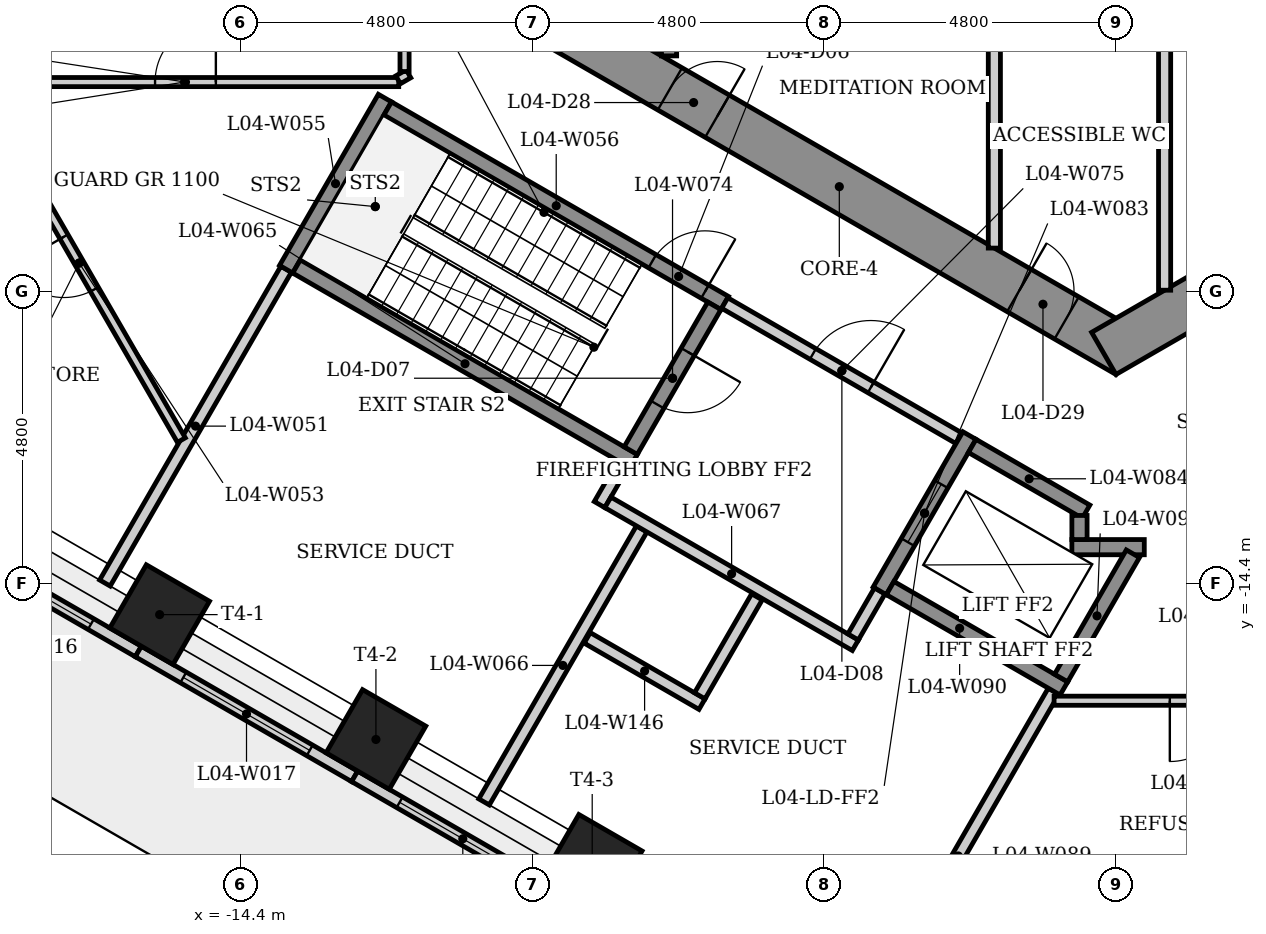
"""IFC4 building model, lengths in metres.
Left out: names, types, materials, properties, quantities, classifications, styles, units other than length and angle.
Written with IfcOpenShell. Run it as: python <this file> out.ifc"""

import sys

from ifc_helpers import new_model, si_unit, direction, frame, frame_2d, origin, origin_2d, place, context, subcontext, project, spatial, rectangle, extrude, element, fill, save


model = new_model("IFC4")
c1 = context("Model", 3, precision=1e-05, world=origin(), true_north=direction((0.0, 1.0)))
c2 = subcontext(c1, "Body", "Model", "MODEL_VIEW")
j1 = project(units=[si_unit("LENGTHUNIT", "METRE"), si_unit("PLANEANGLEUNIT", "RADIAN")], contexts=[c1])
p1 = place(None, origin())
s1 = spatial("IfcSite", under=j1, at=p1, CompositionType="ELEMENT")
p2 = place(p1, origin())
s2 = spatial("IfcBuilding", under=s1, at=p2, CompositionType="ELEMENT")
p3 = place(p2, frame((0.0, 0.0, 20.5)))
s3 = spatial("IfcBuildingStorey", under=s2, at=p3, CompositionType="ELEMENT", Elevation=20.5)
p4 = place(p3, frame((-9.3, -5.138, 0.0), z_axis=(0.0, 0.0, 1.0), x_axis=(0.866023993627, -0.500002442456, 0.0)))
e1 = element("IfcWall", 1, at=p4, inside=s3, PredefinedType="SHEAR", context=c2, shape_type="SweptSolid", body=[
    extrude(rectangle(XDim=10.97, YDim=0.8, at=frame_2d((5.485, 0.0))), origin(), (0.0, 0.0, 1.0), 5.0),
])
p5 = place(p4, frame((2.268, 0.0, 0.0)))
e2 = element("IfcOpeningElement", 2, at=p5, cuts=e1, PredefinedType="OPENING", context=c2, shape_type="SweptSolid", body=[
    extrude(rectangle(XDim=0.9, YDim=2.1, at=frame_2d((0.45, 1.05))), frame((0.0, 0.41, 0.0), z_axis=(0.0, -1.0, 0.0), x_axis=(1.0, 0.0, 0.0)), (0.0, 0.0, 1.0), 0.82),
])
p6 = place(p4, frame((8.903, 0.0, 0.0)))
e3 = element("IfcOpeningElement", 3, at=p6, cuts=e1, PredefinedType="OPENING", context=c2, shape_type="SweptSolid", body=[
    extrude(rectangle(XDim=0.9, YDim=2.1, at=frame_2d((0.45, 1.05))), frame((0.0, 0.41, 0.0), z_axis=(0.0, -1.0, 0.0), x_axis=(1.0, 0.0, 0.0)), (0.0, 0.0, 1.0), 0.82),
])
p7 = place(p3, frame((-0.2, -10.623, 0.0), z_axis=(0.0, 0.0, 1.0), x_axis=(0.866023993627, 0.500002442456, 0.0)))
e4 = element("IfcWall", 4, at=p7, inside=s3, PredefinedType="SHEAR", context=c2, shape_type="SweptSolid", body=[
    extrude(rectangle(XDim=10.97, YDim=0.8, at=frame_2d((5.485, 0.0))), origin(), (0.0, 0.0, 1.0), 5.0),
])
p8 = place(p7, frame((7.108, 0.0, 0.0)))
e5 = element("IfcOpeningElement", 5, at=p8, cuts=e4, PredefinedType="OPENING", context=c2, shape_type="SweptSolid", body=[
    extrude(rectangle(XDim=0.9, YDim=2.1, at=frame_2d((0.45, 1.05))), frame((0.0, 0.41, 0.0), z_axis=(0.0, -1.0, 0.0), x_axis=(1.0, 0.0, 0.0)), (0.0, 0.0, 1.0), 0.82),
])
for number, where, z_axis, x_axis in (
    (6, (-15.728, -14.92, 0.0), (0.0, 0.0, 1.0), (-0.5, -0.866, 0.0)),
    (7, (-12.171, -16.973, 0.0), (0.0, 0.0, 1.0), (-0.5, -0.866, 0.0)),
    (8, (-8.614, -19.027, 0.0), (0.0, 0.0, 1.0), (-0.5, -0.866, 0.0)),
):
    element("IfcColumn", number, at=place(p3, frame(where, z_axis=z_axis, x_axis=x_axis)), inside=s3, PredefinedType="COLUMN", context=c2, shape_type="SweptSolid", body=[
        extrude(rectangle(XDim=1.2, YDim=1.2, at=origin_2d()), origin(), (0.0, 0.0, 1.0), 5.0),
    ])
p9 = place(p3, frame((-19.714, -13.426, 0.0), z_axis=(0.0, 0.0, 1.0), x_axis=(0.866041321553, -0.499972428603, 0.0)))
e9 = element("IfcWall", 9, at=p9, inside=s3, PredefinedType="SOLIDWALL", context=c2, shape_type="SweptSolid", body=[
    extrude(rectangle(XDim=4.199, YDim=0.2, at=frame_2d((2.1, 0.0))), origin(), (0.0, 0.0, 1.0), 4.88),
])
p10 = place(p9, frame((0.899, 0.0, 0.8)))
e10 = element("IfcOpeningElement", 10, at=p10, cuts=e9, PredefinedType="OPENING", context=c2, shape_type="SweptSolid", body=[
    extrude(rectangle(XDim=2.4, YDim=2.4, at=frame_2d((1.2, 1.2))), frame((0.0, 0.11, 0.0), z_axis=(0.0, -1.0, 0.0), x_axis=(1.0, 0.0, 0.0)), (0.0, 0.0, 1.0), 0.22),
])
p11 = place(p3, frame((-16.078, -15.526, 0.0), z_axis=(0.0, 0.0, 1.0), x_axis=(0.866029215606, -0.499993397673, 0.0)))
e11 = element("IfcWall", 11, at=p11, inside=s3, PredefinedType="SOLIDWALL", context=c2, shape_type="SweptSolid", body=[
    extrude(rectangle(XDim=4.108, YDim=0.2, at=frame_2d((2.054, 0.0))), origin(), (0.0, 0.0, 1.0), 4.88),
])
p12 = place(p11, frame((0.854, 0.0, 0.8)))
e12 = element("IfcOpeningElement", 12, at=p12, cuts=e11, PredefinedType="OPENING", context=c2, shape_type="SweptSolid", body=[
    extrude(rectangle(XDim=2.4, YDim=2.4, at=frame_2d((1.2, 1.2))), frame((0.0, 0.11, 0.0), z_axis=(0.0, -1.0, 0.0), x_axis=(1.0, 0.0, 0.0)), (0.0, 0.0, 1.0), 0.22),
])
p13 = place(p3, frame((-12.52, -17.58, 0.0), z_axis=(0.0, 0.0, 1.0), x_axis=(0.866021252249, -0.500007190601, 0.0)))
e13 = element("IfcWall", 13, at=p13, inside=s3, PredefinedType="SOLIDWALL", context=c2, shape_type="SweptSolid", body=[
    extrude(rectangle(XDim=4.107, YDim=0.2, at=frame_2d((2.053, 0.0))), origin(), (0.0, 0.0, 1.0), 4.88),
])
p14 = place(p13, frame((0.854, 0.0, 0.8)))
e14 = element("IfcOpeningElement", 14, at=p14, cuts=e13, PredefinedType="OPENING", context=c2, shape_type="SweptSolid", body=[
    extrude(rectangle(XDim=2.4, YDim=2.4, at=frame_2d((1.2, 1.2))), frame((0.0, 0.11, 0.0), z_axis=(0.0, -1.0, 0.0), x_axis=(1.0, 0.0, 0.0)), (0.0, 0.0, 1.0), 0.22),
])
p15 = place(p3, frame((-18.845, -6.161, 0.0), z_axis=(0.0, 0.0, 1.0), x_axis=(1.0, 0.0, 0.0)))
e15 = element("IfcWall", 15, at=p15, inside=s3, PredefinedType="PARTITIONING", context=c2, shape_type="SweptSolid", body=[
    extrude(rectangle(XDim=7.049, YDim=0.15, at=frame_2d((3.525, 0.0))), origin(), (0.0, 0.0, 1.0), 4.65),
])
p16 = place(p15, frame((3.042, 0.0, 0.0)))
e16 = element("IfcOpeningElement", 16, at=p16, cuts=e15, PredefinedType="OPENING", context=c2, shape_type="SweptSolid", body=[
    extrude(rectangle(XDim=1.0, YDim=2.1, at=frame_2d((0.5, 1.05))), frame((0.0, 0.085, 0.0), z_axis=(0.0, -1.0, 0.0), x_axis=(1.0, 0.0, 0.0)), (0.0, 0.0, 1.0), 0.17),
])
p17 = place(p3, frame((-16.628, -14.4, 0.0), z_axis=(0.0, 0.0, 1.0), x_axis=(0.499994325412, 0.866028679985, 0.0)))
e17 = element("IfcWall", 17, at=p17, inside=s3, PredefinedType="PLUMBINGWALL", context=c2, shape_type="SweptSolid", body=[
    extrude(rectangle(XDim=5.959, YDim=0.2, at=frame_2d((2.98, 0.0))), origin(), (0.0, 0.0, 1.0), 4.65),
])
p18 = place(p3, frame((-15.371, -12.049, 0.0), z_axis=(0.0, 0.0, 1.0), x_axis=(-0.499996914373, 0.866027185264, 0.0)))
e18 = element("IfcWall", 18, at=p18, inside=s3, PredefinedType="PARTITIONING", context=c2, shape_type="SweptSolid", body=[
    extrude(rectangle(XDim=6.725, YDim=0.15, at=frame_2d((3.362, 0.0))), origin(), (0.0, 0.0, 1.0), 4.65),
])
p19 = place(p18, frame((2.862, 0.0, 0.0)))
e19 = element("IfcOpeningElement", 19, at=p19, cuts=e18, PredefinedType="OPENING", context=c2, shape_type="SweptSolid", body=[
    extrude(rectangle(XDim=1.0, YDim=2.1, at=frame_2d((0.5, 1.05))), frame((0.0, 0.085, 0.0), z_axis=(0.0, -1.0, 0.0), x_axis=(1.0, 0.0, 0.0)), (0.0, 0.0, 1.0), 0.17),
])
p20 = place(p3, frame((-13.648, -9.239, 0.0), z_axis=(0.0, 0.0, 1.0), x_axis=(0.500017246033, 0.866015446554, 0.0)))
e20 = element("IfcWall", 20, at=p20, inside=s3, PredefinedType="SHEAR", context=c2, shape_type="SweptSolid", body=[
    extrude(rectangle(XDim=3.25, YDim=0.25, at=frame_2d((1.625, 0.0))), origin(), (0.0, 0.0, 1.0), 4.65),
])
p21 = place(p3, frame((-11.977, -6.595, 0.0), z_axis=(0.0, 0.0, 1.0), x_axis=(0.866025499775, -0.499999833739, 0.0)))
e21 = element("IfcWall", 21, at=p21, inside=s3, PredefinedType="SHEAR", context=c2, shape_type="SweptSolid", body=[
    extrude(rectangle(XDim=6.4, YDim=0.25, at=frame_2d((3.2, 0.0))), origin(), (0.0, 0.0, 1.0), 4.65),
])
p22 = place(p21, frame((5.025, 0.0, 0.0)))
e22 = element("IfcOpeningElement", 22, at=p22, cuts=e21, PredefinedType="OPENING", context=c2, shape_type="SweptSolid", body=[
    extrude(rectangle(XDim=1.0, YDim=2.1, at=frame_2d((0.5, 1.05))), frame((0.0, 0.135, 0.0), z_axis=(0.0, -1.0, 0.0), x_axis=(1.0, 0.0, 0.0)), (0.0, 0.0, 1.0), 0.27),
])
p23 = place(p3, frame((-11.806, -6.123, 0.0), z_axis=(0.0, 0.0, 1.0), x_axis=(0.866103179807, 0.499865263774, 0.0)))
e23 = element("IfcWall", 23, at=p23, inside=s3, PredefinedType="PARTITIONING", context=c2, shape_type="SweptSolid", body=[
    extrude(rectangle(XDim=0.197, YDim=0.15, at=frame_2d((0.099, 0.0))), origin(), (0.0, 0.0, 1.0), 4.65),
])
p24 = place(p3, frame((-11.7, -5.987, 0.0), z_axis=(0.0, 0.0, 1.0), x_axis=(0.0, 1.0, 0.0)))
e24 = element("IfcWall", 24, at=p24, inside=s3, PredefinedType="PARTITIONING", context=c2, shape_type="SweptSolid", body=[
    extrude(rectangle(XDim=12.125, YDim=0.15, at=frame_2d((6.062, 0.0))), origin(), (0.0, 0.0, 1.0), 4.65),
])
p25 = place(p24, frame((7.507, 0.0, 0.0)))
e25 = element("IfcOpeningElement", 25, at=p25, cuts=e24, PredefinedType="OPENING", context=c2, shape_type="SweptSolid", body=[
    extrude(rectangle(XDim=1.0, YDim=2.1, at=frame_2d((0.5, 1.05))), frame((0.0, 0.085, 0.0), z_axis=(0.0, -1.0, 0.0), x_axis=(1.0, 0.0, 0.0)), (0.0, 0.0, 1.0), 0.17),
])
p26 = place(p3, frame((-8.493, -13.11, 0.0), z_axis=(0.0, 0.0, 1.0), x_axis=(0.500067724834, 0.865986299303, 0.0)))
e26 = element("IfcWall", 26, at=p26, inside=s3, PredefinedType="PLUMBINGWALL", context=c2, shape_type="SweptSolid", body=[
    extrude(rectangle(XDim=0.775, YDim=0.2, at=frame_2d((0.388, 0.0))), origin(), (0.0, 0.0, 1.0), 4.65),
])
p27 = place(p3, frame((-7.935, -12.393, 0.0), z_axis=(0.0, 0.0, 1.0), x_axis=(-0.866025499775, 0.499999833739, 0.0)))
e27 = element("IfcWall", 27, at=p27, inside=s3, PredefinedType="SHEAR", context=c2, shape_type="SweptSolid", body=[
    extrude(rectangle(XDim=6.4, YDim=0.25, at=frame_2d((3.2, 0.0))), origin(), (0.0, 0.0, 1.0), 4.65),
])
p28 = place(p3, frame((-7.8, -13.51, 0.0), z_axis=(0.0, 0.0, 1.0), x_axis=(-0.499998276493, -0.866026398849, 0.0)))
e28 = element("IfcWall", 28, at=p28, inside=s3, PredefinedType="PLUMBINGWALL", context=c2, shape_type="SweptSolid", body=[
    extrude(rectangle(XDim=5.185, YDim=0.2, at=frame_2d((2.592, 0.0))), origin(), (0.0, 0.0, 1.0), 4.65),
])
p29 = place(p3, frame((-8.356, -13.073, 0.0), z_axis=(0.0, 0.0, 1.0), x_axis=(0.866038532462, -0.499977259774, 0.0)))
e29 = element("IfcWall", 29, at=p29, inside=s3, PredefinedType="PLUMBINGWALL", context=c2, shape_type="SweptSolid", body=[
    extrude(rectangle(XDim=4.7, YDim=0.2, at=frame_2d((2.35, 0.0))), origin(), (0.0, 0.0, 1.0), 4.65),
])
p30 = place(p3, frame((-7.35, -5.73, 0.0), z_axis=(0.0, 0.0, 1.0), x_axis=(0.0, 1.0, 0.0)))
e30 = element("IfcWall", 30, at=p30, inside=s3, PredefinedType="SHEAR", context=c2, shape_type="SweptSolid", body=[
    extrude(rectangle(XDim=4.055, YDim=0.25, at=frame_2d((2.028, 0.0))), origin(), (0.0, 0.0, 1.0), 4.65),
])
p31 = place(p3, frame((-6.605, -9.841, 0.0), z_axis=(0.0, 0.0, 1.0), x_axis=(-0.499996545922, -0.866027397988, 0.0)))
e31 = element("IfcWall", 31, at=p31, inside=s3, PredefinedType="SHEAR", context=c2, shape_type="SweptSolid", body=[
    extrude(rectangle(XDim=2.75, YDim=0.25, at=frame_2d((1.375, 0.0))), origin(), (0.0, 0.0, 1.0), 4.65),
])
p32 = place(p31, frame((0.875, 0.0, 0.0)))
e32 = element("IfcOpeningElement", 32, at=p32, cuts=e31, PredefinedType="OPENING", context=c2, shape_type="SweptSolid", body=[
    extrude(rectangle(XDim=1.0, YDim=2.1, at=frame_2d((0.5, 1.05))), frame((0.0, 0.135, 0.0), z_axis=(0.0, -1.0, 0.0), x_axis=(1.0, 0.0, 0.0)), (0.0, 0.0, 1.0), 0.27),
])
p33 = place(p3, frame((-6.435, -9.795, 0.0), z_axis=(0.0, 0.0, 1.0), x_axis=(0.866012907634, -0.500021643343, 0.0)))
e33 = element("IfcWall", 33, at=p33, inside=s3, PredefinedType="PARTITIONING", context=c2, shape_type="SweptSolid", body=[
    extrude(rectangle(XDim=4.45, YDim=0.2, at=frame_2d((2.225, 0.0))), origin(), (0.0, 0.0, 1.0), 4.65),
])
p34 = place(p33, frame((1.675, 0.0, 0.0)))
e34 = element("IfcOpeningElement", 34, at=p34, cuts=e33, PredefinedType="OPENING", context=c2, shape_type="SweptSolid", body=[
    extrude(rectangle(XDim=1.1, YDim=2.1, at=frame_2d((0.55, 1.05))), frame((0.0, 0.11, 0.0), z_axis=(0.0, -1.0, 0.0), x_axis=(1.0, 0.0, 0.0)), (0.0, 0.0, 1.0), 0.22),
])
p35 = place(p3, frame((-3.885, -14.529, 0.0), z_axis=(0.0, 0.0, 1.0), x_axis=(-0.499859285417, -0.866106630146, 0.0)))
e35 = element("IfcWall", 35, at=p35, inside=s3, PredefinedType="PLUMBINGWALL", context=c2, shape_type="SweptSolid", body=[
    extrude(rectangle(XDim=0.875, YDim=0.2, at=frame_2d((0.438, 0.0))), origin(), (0.0, 0.0, 1.0), 4.65),
])
p36 = place(p3, frame((-2.41, -11.974, 0.0), z_axis=(0.0, 0.0, 1.0), x_axis=(-0.500001826776, -0.866024349092, 0.0)))
e36 = element("IfcWall", 36, at=p36, inside=s3, PredefinedType="SHEAR", context=c2, shape_type="SweptSolid", body=[
    extrude(rectangle(XDim=2.95, YDim=0.25, at=frame_2d((1.475, 0.0))), origin(), (0.0, 0.0, 1.0), 4.65),
])
p37 = place(p36, frame((0.925, 0.0, 0.0)))
e37 = element("IfcOpeningElement", 37, at=p37, cuts=e36, PredefinedType="OPENING", context=c2, shape_type="SweptSolid", body=[
    extrude(rectangle(XDim=1.1, YDim=2.1, at=frame_2d((0.55, 1.05))), frame((0.0, 0.135, 0.0), z_axis=(0.0, -1.0, 0.0), x_axis=(1.0, 0.0, 0.0)), (0.0, 0.0, 1.0), 0.27),
])
p38 = place(p3, frame((-2.364, -12.145, 0.0), z_axis=(0.0, 0.0, 1.0), x_axis=(0.86603892542, -0.499976579108, 0.0)))
e38 = element("IfcWall", 38, at=p38, inside=s3, PredefinedType="SHEAR", context=c2, shape_type="SweptSolid", body=[
    extrude(rectangle(XDim=2.162, YDim=0.25, at=frame_2d((1.081, 0.0))), origin(), (0.0, 0.0, 1.0), 4.65),
])
p39 = place(p3, frame((-2.0, -5.275, 0.0), z_axis=(0.0, 0.0, 1.0), x_axis=(0.0, -1.0, 0.0)))
e39 = element("IfcWall", 39, at=p39, inside=s3, PredefinedType="PARTITIONING", context=c2, shape_type="SweptSolid", body=[
    extrude(rectangle(XDim=3.616, YDim=0.2, at=frame_2d((1.808, 0.0))), origin(), (0.0, 0.0, 1.0), 4.65),
])
p40 = place(p3, frame((-4.157, -21.6, 0.0), z_axis=(0.0, 0.0, 1.0), x_axis=(0.499998165157, 0.866026463129, 0.0)))
e40 = element("IfcWall", 40, at=p40, inside=s3, PredefinedType="PLUMBINGWALL", context=c2, shape_type="SweptSolid", body=[
    extrude(rectangle(XDim=6.26, YDim=0.2, at=frame_2d((3.13, 0.0))), origin(), (0.0, 0.0, 1.0), 4.65),
])
p41 = place(p3, frame((-0.856, -16.133, 0.0), z_axis=(0.0, 0.0, 1.0), x_axis=(-0.866021716278, 0.500006386895, 0.0)))
e41 = element("IfcWall", 41, at=p41, inside=s3, PredefinedType="SHEAR", context=c2, shape_type="SweptSolid", body=[
    extrude(rectangle(XDim=3.3, YDim=0.25, at=frame_2d((1.65, 0.0))), origin(), (0.0, 0.0, 1.0), 4.65),
])
p42 = place(p3, frame((-0.725, -13.81, 0.0), z_axis=(0.0, 0.0, 1.0), x_axis=(1.0, 0.0, 0.0)))
e42 = element("IfcWall", 42, at=p42, inside=s3, PredefinedType="SHEAR", context=c2, shape_type="SweptSolid", body=[
    extrude(rectangle(XDim=1.191, YDim=0.25, at=frame_2d((0.595, 0.0))), origin(), (0.0, 0.0, 1.0), 4.65),
])
p43 = place(p3, frame((-0.6, -13.289, 0.0), z_axis=(0.0, 0.0, 1.0), x_axis=(0.0, -1.0, 0.0)))
e43 = element("IfcWall", 43, at=p43, inside=s3, PredefinedType="SHEAR", context=c2, shape_type="SweptSolid", body=[
    extrude(rectangle(XDim=0.396, YDim=0.25, at=frame_2d((0.198, 0.0))), origin(), (0.0, 0.0, 1.0), 5.0),
])
p44 = place(p3, frame((0.278, -13.918, 0.0), z_axis=(0.0, 0.0, 1.0), x_axis=(-0.49998806882, -0.866032292145, 0.0)))
e44 = element("IfcWall", 44, at=p44, inside=s3, PredefinedType="SHEAR", context=c2, shape_type="SweptSolid", body=[
    extrude(rectangle(XDim=2.36, YDim=0.25, at=frame_2d((1.18, 0.0))), origin(), (0.0, 0.0, 1.0), 5.0),
])
p45 = place(p3, frame((0.8, -5.275, 0.0), z_axis=(0.0, 0.0, 1.0), x_axis=(0.0, -1.0, 0.0)))
e45 = element("IfcWall", 45, at=p45, inside=s3, PredefinedType="PARTITIONING", context=c2, shape_type="SweptSolid", body=[
    extrude(rectangle(XDim=4.309, YDim=0.2, at=frame_2d((2.155, 0.0))), origin(), (0.0, 0.0, 1.0), 4.65),
])
p46 = place(p3, frame((3.789, -16.336, 0.0), z_axis=(0.0, 0.0, 1.0), x_axis=(-1.0, 0.0, 0.0)))
e46 = element("IfcWall", 46, at=p46, inside=s3, PredefinedType="PARTITIONING", context=c2, shape_type="SweptSolid", body=[
    extrude(rectangle(XDim=4.807, YDim=0.15, at=frame_2d((2.403, 0.0))), origin(), (0.0, 0.0, 1.0), 4.65),
])
p47 = place(p46, frame((1.903, 0.0, 0.0)))
e47 = element("IfcOpeningElement", 47, at=p47, cuts=e46, PredefinedType="OPENING", context=c2, shape_type="SweptSolid", body=[
    extrude(rectangle(XDim=1.0, YDim=2.1, at=frame_2d((0.5, 1.05))), frame((0.0, 0.085, 0.0), z_axis=(0.0, -1.0, 0.0), x_axis=(1.0, 0.0, 0.0)), (0.0, 0.0, 1.0), 0.17),
])
p48 = place(p3, frame((-6.808, -16.392, 0.0), z_axis=(0.0, 0.0, 1.0), x_axis=(-0.866008413041, 0.500029427677, 0.0)))
e48 = element("IfcWall", 48, at=p48, inside=s3, PredefinedType="PLUMBINGWALL", context=c2, shape_type="SweptSolid", body=[
    extrude(rectangle(XDim=2.18, YDim=0.2, at=frame_2d((1.09, 0.0))), origin(), (0.0, 0.0, 1.0), 4.65),
])
p49 = place(p3, frame((-5.905, -14.627, 0.0), z_axis=(0.0, 0.0, 1.0), x_axis=(-0.499966013754, -0.866045024864, 0.0)))
e49 = element("IfcWall", 49, at=p49, inside=s3, PredefinedType="PLUMBINGWALL", context=c2, shape_type="SweptSolid", body=[
    extrude(rectangle(XDim=1.88, YDim=0.2, at=frame_2d((0.94, 0.0))), origin(), (0.0, 0.0, 1.0), 4.65),
])
p50 = place(p10, origin())
e50 = element("IfcWindow", 50, at=p50, inside=s3, PartitioningType="SINGLE_PANEL", PredefinedType="WINDOW", context=c2, shape_type="SweptSolid", body=[
    extrude(rectangle(XDim=2.4, YDim=2.4, at=frame_2d((1.2, 1.2))), frame((0.0, 0.03, 0.0), z_axis=(0.0, -1.0, 0.0), x_axis=(1.0, 0.0, 0.0)), (0.0, 0.0, 1.0), 0.06),
])
fill(e10, e50)
p51 = place(p12, origin())
e51 = element("IfcWindow", 51, at=p51, inside=s3, PartitioningType="SINGLE_PANEL", PredefinedType="WINDOW", context=c2, shape_type="SweptSolid", body=[
    extrude(rectangle(XDim=2.4, YDim=2.4, at=frame_2d((1.2, 1.2))), frame((0.0, 0.03, 0.0), z_axis=(0.0, -1.0, 0.0), x_axis=(1.0, 0.0, 0.0)), (0.0, 0.0, 1.0), 0.06),
])
fill(e12, e51)
p52 = place(p14, origin())
e52 = element("IfcWindow", 52, at=p52, inside=s3, PartitioningType="SINGLE_PANEL", PredefinedType="WINDOW", context=c2, shape_type="SweptSolid", body=[
    extrude(rectangle(XDim=2.4, YDim=2.4, at=frame_2d((1.2, 1.2))), frame((0.0, 0.03, 0.0), z_axis=(0.0, -1.0, 0.0), x_axis=(1.0, 0.0, 0.0)), (0.0, 0.0, 1.0), 0.06),
])
fill(e14, e52)
p53 = place(p22, origin())
e53 = element("IfcDoor", 53, at=p53, inside=s3, OperationType="SINGLE_SWING_RIGHT", PredefinedType="DOOR", context=c2, shape_type="SweptSolid", body=[
    extrude(rectangle(XDim=1.0, YDim=2.1, at=frame_2d((0.5, 1.05))), frame((0.0, 0.025, 0.0), z_axis=(0.0, -1.0, 0.0), x_axis=(1.0, 0.0, 0.0)), (0.0, 0.0, 1.0), 0.05),
])
fill(e22, e53)
p54 = place(p32, origin())
e54 = element("IfcDoor", 54, at=p54, inside=s3, OperationType="SINGLE_SWING_LEFT", PredefinedType="DOOR", context=c2, shape_type="SweptSolid", body=[
    extrude(rectangle(XDim=1.0, YDim=2.1, at=frame_2d((0.5, 1.05))), frame((0.0, 0.025, 0.0), z_axis=(0.0, -1.0, 0.0), x_axis=(1.0, 0.0, 0.0)), (0.0, 0.0, 1.0), 0.05),
])
fill(e32, e54)
p55 = place(p34, origin())
e55 = element("IfcDoor", 55, at=p55, inside=s3, OperationType="SINGLE_SWING_RIGHT", PredefinedType="DOOR", context=c2, shape_type="SweptSolid", body=[
    extrude(rectangle(XDim=1.1, YDim=2.1, at=frame_2d((0.55, 1.05))), frame((0.0, 0.025, 0.0), z_axis=(0.0, -1.0, 0.0), x_axis=(1.0, 0.0, 0.0)), (0.0, 0.0, 1.0), 0.05),
])
fill(e34, e55)
p56 = place(p37, origin())
e56 = element("IfcDoor", 56, at=p56, inside=s3, OperationType="SLIDING_TO_LEFT", PredefinedType="DOOR", context=c2, shape_type="SweptSolid", body=[
    extrude(rectangle(XDim=1.1, YDim=2.1, at=frame_2d((0.55, 1.05))), frame((0.0, 0.025, 0.0), z_axis=(0.0, -1.0, 0.0), x_axis=(1.0, 0.0, 0.0)), (0.0, 0.0, 1.0), 0.05),
])
fill(e37, e56)
p57 = place(p16, origin())
e57 = element("IfcDoor", 57, at=p57, inside=s3, OperationType="SINGLE_SWING_RIGHT", PredefinedType="DOOR", context=c2, shape_type="SweptSolid", body=[
    extrude(rectangle(XDim=1.0, YDim=2.1, at=frame_2d((0.5, 1.05))), frame((0.0, 0.025, 0.0), z_axis=(0.0, -1.0, 0.0), x_axis=(1.0, 0.0, 0.0)), (0.0, 0.0, 1.0), 0.05),
])
fill(e16, e57)
p58 = place(p19, origin())
e58 = element("IfcDoor", 58, at=p58, inside=s3, OperationType="SINGLE_SWING_RIGHT", PredefinedType="DOOR", context=c2, shape_type="SweptSolid", body=[
    extrude(rectangle(XDim=1.0, YDim=2.1, at=frame_2d((0.5, 1.05))), frame((0.0, 0.025, 0.0), z_axis=(0.0, -1.0, 0.0), x_axis=(1.0, 0.0, 0.0)), (0.0, 0.0, 1.0), 0.05),
])
fill(e19, e58)
p59 = place(p47, origin())
e59 = element("IfcDoor", 59, at=p59, inside=s3, OperationType="SINGLE_SWING_RIGHT", PredefinedType="DOOR", context=c2, shape_type="SweptSolid", body=[
    extrude(rectangle(XDim=1.0, YDim=2.1, at=frame_2d((0.5, 1.05))), frame((0.0, 0.025, 0.0), z_axis=(0.0, -1.0, 0.0), x_axis=(1.0, 0.0, 0.0)), (0.0, 0.0, 1.0), 0.05),
])
fill(e47, e59)
p60 = place(p5, origin())
e60 = element("IfcDoor", 60, at=p60, inside=s3, OperationType="SINGLE_SWING_RIGHT", PredefinedType="DOOR", context=c2, shape_type="SweptSolid", body=[
    extrude(rectangle(XDim=0.9, YDim=2.1, at=frame_2d((0.45, 1.05))), frame((0.0, 0.025, 0.0), z_axis=(0.0, -1.0, 0.0), x_axis=(1.0, 0.0, 0.0)), (0.0, 0.0, 1.0), 0.05),
])
fill(e2, e60)
p61 = place(p6, origin())
e61 = element("IfcDoor", 61, at=p61, inside=s3, OperationType="SINGLE_SWING_LEFT", PredefinedType="DOOR", context=c2, shape_type="SweptSolid", body=[
    extrude(rectangle(XDim=0.9, YDim=2.1, at=frame_2d((0.45, 1.05))), frame((0.0, 0.025, 0.0), z_axis=(0.0, -1.0, 0.0), x_axis=(1.0, 0.0, 0.0)), (0.0, 0.0, 1.0), 0.05),
])
fill(e3, e61)
save(model, sys.argv[1])
